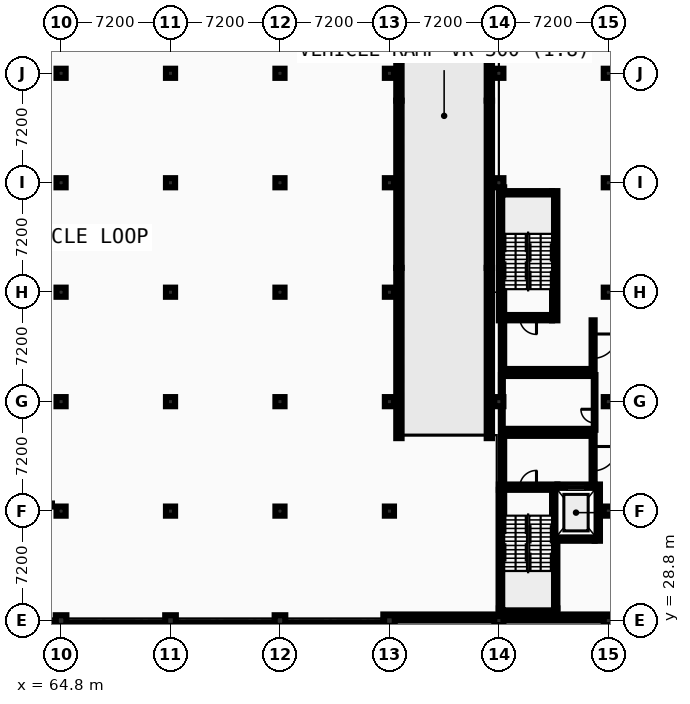
"""IFC4 building model, lengths in metres.
Left out: names, types, materials, properties, quantities, classifications, styles, units other than length and angle.
Written with IfcOpenShell. Run it as: python <this file> out.ifc"""

import sys

from ifc_helpers import new_model, si_unit, direction, frame, frame_2d, origin, origin_2d, place, context, subcontext, project, spatial, rectangle, extrude, element, fill, save


model = new_model("IFC4")
c1 = context("Model", 3, precision=1e-05, world=origin(), true_north=direction((0.0, 1.0)))
c2 = subcontext(c1, "Body", "Model", "MODEL_VIEW")
j1 = project(units=[si_unit("LENGTHUNIT", "METRE"), si_unit("PLANEANGLEUNIT", "RADIAN")], contexts=[c1])
p1 = place(None, origin())
s1 = spatial("IfcSite", under=j1, at=p1, CompositionType="ELEMENT")
p2 = place(p1, origin())
s2 = spatial("IfcBuilding", under=s1, at=p2, CompositionType="ELEMENT")
p3 = place(p2, frame((0.0, 0.0, -4.8)))
s3 = spatial("IfcBuildingStorey", under=s2, at=p3, CompositionType="ELEMENT", Elevation=-4.8)
p4 = place(p3, frame((64.8, 28.8, 0.0), z_axis=(0.0, 0.0, 1.0), x_axis=(1.0, 0.0, 0.0)))
e1 = element("IfcColumn", 1, at=p4, inside=s3, PredefinedType="COLUMN", context=c2, shape_type="SweptSolid", body=[
    extrude(rectangle(XDim=0.7, YDim=0.7, at=origin_2d()), origin(), (0.0, 0.0, 1.0), 4.8),
])
for number, where, z_axis, x_axis in (
    (2, (64.8, 36.0, 0.0), (0.0, 0.0, 1.0), (1.0, 0.0, 0.0)),
    (3, (64.8, 43.2, 0.0), (0.0, 0.0, 1.0), (1.0, 0.0, 0.0)),
    (4, (64.8, 50.4, 0.0), (0.0, 0.0, 1.0), (1.0, 0.0, 0.0)),
    (5, (64.8, 57.6, 0.0), (0.0, 0.0, 1.0), (1.0, 0.0, 0.0)),
    (6, (64.8, 64.8, 0.0), (0.0, 0.0, 1.0), (1.0, 0.0, 0.0)),
):
    element("IfcColumn", number, at=place(p3, frame(where, z_axis=z_axis, x_axis=x_axis)), inside=s3, PredefinedType="COLUMN", context=c2, shape_type="SweptSolid", body=[
        extrude(rectangle(XDim=0.6, YDim=0.6, at=origin_2d()), origin(), (0.0, 0.0, 1.0), 4.8),
    ])
p5 = place(p3, frame((72.0, 28.8, 0.0), z_axis=(0.0, 0.0, 1.0), x_axis=(1.0, 0.0, 0.0)))
e7 = element("IfcColumn", 7, at=p5, inside=s3, PredefinedType="COLUMN", context=c2, shape_type="SweptSolid", body=[
    extrude(rectangle(XDim=0.7, YDim=0.7, at=origin_2d()), origin(), (0.0, 0.0, 1.0), 4.8),
])
for number, where, z_axis, x_axis in (
    (8, (72.0, 36.0, 0.0), (0.0, 0.0, 1.0), (1.0, 0.0, 0.0)),
    (9, (72.0, 43.2, 0.0), (0.0, 0.0, 1.0), (1.0, 0.0, 0.0)),
    (10, (72.0, 50.4, 0.0), (0.0, 0.0, 1.0), (1.0, 0.0, 0.0)),
    (11, (72.0, 57.6, 0.0), (0.0, 0.0, 1.0), (1.0, 0.0, 0.0)),
    (12, (72.0, 64.8, 0.0), (0.0, 0.0, 1.0), (1.0, 0.0, 0.0)),
):
    element("IfcColumn", number, at=place(p3, frame(where, z_axis=z_axis, x_axis=x_axis)), inside=s3, PredefinedType="COLUMN", context=c2, shape_type="SweptSolid", body=[
        extrude(rectangle(XDim=0.6, YDim=0.6, at=origin_2d()), origin(), (0.0, 0.0, 1.0), 4.8),
    ])
p6 = place(p3, frame((79.2, 28.8, 0.0), z_axis=(0.0, 0.0, 1.0), x_axis=(1.0, 0.0, 0.0)))
e13 = element("IfcColumn", 13, at=p6, inside=s3, PredefinedType="COLUMN", context=c2, shape_type="SweptSolid", body=[
    extrude(rectangle(XDim=0.7, YDim=0.7, at=origin_2d()), origin(), (0.0, 0.0, 1.0), 4.8),
])
for number, where, z_axis, x_axis in (
    (14, (79.2, 36.0, 0.0), (0.0, 0.0, 1.0), (1.0, 0.0, 0.0)),
    (15, (79.2, 43.2, 0.0), (0.0, 0.0, 1.0), (1.0, 0.0, 0.0)),
    (16, (79.2, 50.4, 0.0), (0.0, 0.0, 1.0), (1.0, 0.0, 0.0)),
    (17, (79.2, 57.6, 0.0), (0.0, 0.0, 1.0), (1.0, 0.0, 0.0)),
    (18, (79.2, 64.8, 0.0), (0.0, 0.0, 1.0), (1.0, 0.0, 0.0)),
):
    element("IfcColumn", number, at=place(p3, frame(where, z_axis=z_axis, x_axis=x_axis)), inside=s3, PredefinedType="COLUMN", context=c2, shape_type="SweptSolid", body=[
        extrude(rectangle(XDim=0.6, YDim=0.6, at=origin_2d()), origin(), (0.0, 0.0, 1.0), 4.8),
    ])
p7 = place(p3, frame((86.4, 28.8, 0.0), z_axis=(0.0, 0.0, 1.0), x_axis=(1.0, 0.0, 0.0)))
e19 = element("IfcColumn", 19, at=p7, inside=s3, PredefinedType="COLUMN", context=c2, shape_type="SweptSolid", body=[
    extrude(rectangle(XDim=0.7, YDim=0.7, at=origin_2d()), origin(), (0.0, 0.0, 1.0), 4.8),
])
for number, where, z_axis, x_axis in (
    (20, (86.4, 36.0, 0.0), (0.0, 0.0, 1.0), (1.0, 0.0, 0.0)),
    (21, (86.4, 43.2, 0.0), (0.0, 0.0, 1.0), (1.0, 0.0, 0.0)),
    (22, (86.4, 50.4, 0.0), (0.0, 0.0, 1.0), (1.0, 0.0, 0.0)),
    (23, (86.4, 57.6, 0.0), (0.0, 0.0, 1.0), (1.0, 0.0, 0.0)),
    (24, (86.4, 64.8, 0.0), (0.0, 0.0, 1.0), (1.0, 0.0, 0.0)),
    (25, (93.6, 28.8, 0.0), (0.0, 0.0, 1.0), (1.0, 0.0, 0.0)),
    (26, (93.6, 43.2, 0.0), (0.0, 0.0, 1.0), (1.0, 0.0, 0.0)),
    (27, (93.6, 57.6, 0.0), (0.0, 0.0, 1.0), (1.0, 0.0, 0.0)),
    (28, (93.6, 64.8, 0.0), (0.0, 0.0, 1.0), (1.0, 0.0, 0.0)),
    (29, (100.8, 28.8, 0.0), (0.0, 0.0, 1.0), (1.0, 0.0, 0.0)),
    (30, (100.8, 36.0, 0.0), (0.0, 0.0, 1.0), (1.0, 0.0, 0.0)),
    (31, (100.8, 43.2, 0.0), (0.0, 0.0, 1.0), (1.0, 0.0, 0.0)),
    (32, (100.8, 50.4, 0.0), (0.0, 0.0, 1.0), (1.0, 0.0, 0.0)),
    (33, (100.8, 57.6, 0.0), (0.0, 0.0, 1.0), (1.0, 0.0, 0.0)),
    (34, (100.8, 64.8, 0.0), (0.0, 0.0, 1.0), (1.0, 0.0, 0.0)),
):
    element("IfcColumn", number, at=place(p3, frame(where, z_axis=z_axis, x_axis=x_axis)), inside=s3, PredefinedType="COLUMN", context=c2, shape_type="SweptSolid", body=[
        extrude(rectangle(XDim=0.6, YDim=0.6, at=origin_2d()), origin(), (0.0, 0.0, 1.0), 4.8),
    ])
p8 = place(p3, frame((86.2, 0.4, 0.0), z_axis=(0.0, 0.0, 1.0), x_axis=(0.0, 1.0, 0.0)))
e35 = element("IfcWall", 35, at=p8, inside=s3, PredefinedType="USERDEFINED", context=c2, shape_type="SweptSolid", body=[
    extrude(rectangle(XDim=28.4, YDim=0.4, at=frame_2d((14.2, 0.0))), origin(), (0.0, 0.0, 1.0), 4.545),
])
p9 = place(p3, frame((86.0, 29.0, 0.0), z_axis=(0.0, 0.0, 1.0), x_axis=(1.0, 0.0, 0.0)))
e36 = element("IfcWall", 36, at=p9, inside=s3, PredefinedType="USERDEFINED", context=c2, shape_type="SweptSolid", body=[
    extrude(rectangle(XDim=36.4, YDim=0.4, at=frame_2d((18.2, 0.0))), origin(), (0.0, 0.0, 1.0), 4.545),
])
p10 = place(p3, frame((87.025, 40.8, 0.0), z_axis=(0.0, 0.0, 1.0), x_axis=(0.0, 1.0, 0.0)))
e37 = element("IfcWall", 37, at=p10, inside=s3, PredefinedType="USERDEFINED", context=c2, shape_type="SweptSolid", body=[
    extrude(rectangle(XDim=11.2, YDim=0.35, at=frame_2d((5.6, 0.0))), origin(), (0.0, 0.0, 1.0), 4.58),
])
p11 = place(p3, frame((87.025, 52.0, 0.0), z_axis=(0.0, 0.0, 1.0), x_axis=(0.0, 1.0, 0.0)))
e38 = element("IfcWall", 38, at=p11, inside=s3, PredefinedType="USERDEFINED", context=c2, shape_type="SweptSolid", body=[
    extrude(rectangle(XDim=11.0, YDim=0.35, at=frame_2d((5.5, 0.0))), origin(), (0.0, 0.0, 1.0), 4.58),
])
p12 = place(p3, frame((87.025, 63.0, 0.0), z_axis=(0.0, 0.0, 1.0), x_axis=(0.0, 1.0, 0.0)))
e39 = element("IfcWall", 39, at=p12, inside=s3, PredefinedType="USERDEFINED", context=c2, shape_type="SweptSolid", body=[
    extrude(rectangle(XDim=15.8, YDim=0.35, at=frame_2d((7.9, 0.0))), origin(), (0.0, 0.0, 1.0), 4.58),
])
p13 = place(p3, frame((92.975, 40.8, 0.0), z_axis=(0.0, 0.0, 1.0), x_axis=(0.0, 1.0, 0.0)))
e40 = element("IfcWall", 40, at=p13, inside=s3, PredefinedType="USERDEFINED", context=c2, shape_type="SweptSolid", body=[
    extrude(rectangle(XDim=11.2, YDim=0.35, at=frame_2d((5.6, 0.0))), origin(), (0.0, 0.0, 1.0), 4.58),
])
p14 = place(p3, frame((92.975, 52.0, 0.0), z_axis=(0.0, 0.0, 1.0), x_axis=(0.0, 1.0, 0.0)))
e41 = element("IfcWall", 41, at=p14, inside=s3, PredefinedType="USERDEFINED", context=c2, shape_type="SweptSolid", body=[
    extrude(rectangle(XDim=11.0, YDim=0.35, at=frame_2d((5.5, 0.0))), origin(), (0.0, 0.0, 1.0), 4.58),
])
p15 = place(p3, frame((92.975, 63.0, 0.0), z_axis=(0.0, 0.0, 1.0), x_axis=(0.0, 1.0, 0.0)))
e42 = element("IfcWall", 42, at=p15, inside=s3, PredefinedType="USERDEFINED", context=c2, shape_type="SweptSolid", body=[
    extrude(rectangle(XDim=15.8, YDim=0.35, at=frame_2d((7.9, 0.0))), origin(), (0.0, 0.0, 1.0), 4.58),
])
p16 = place(p3, frame((93.6, 29.425, 0.0), z_axis=(0.0, 0.0, 1.0), x_axis=(1.0, 0.0, 0.0)))
e43 = element("IfcWall", 43, at=p16, inside=s3, PredefinedType="SHEAR", context=c2, shape_type="SweptSolid", body=[
    extrude(rectangle(XDim=3.85, YDim=0.35, at=frame_2d((1.925, 0.0))), origin(), (0.0, 0.0, 1.0), 4.545),
])
p17 = place(p3, frame((93.6, 37.575, 0.0), z_axis=(0.0, 0.0, 1.0), x_axis=(1.0, 0.0, 0.0)))
e44 = element("IfcWall", 44, at=p17, inside=s3, PredefinedType="SHEAR", context=c2, shape_type="SweptSolid", body=[
    extrude(rectangle(XDim=3.85, YDim=0.35, at=frame_2d((1.925, 0.0))), origin(), (0.0, 0.0, 1.0), 4.545),
])
p18 = place(p17, frame((1.375, 0.0, 0.0)))
e45 = element("IfcOpeningElement", 45, at=p18, cuts=e44, PredefinedType="OPENING", context=c2, shape_type="SweptSolid", body=[
    extrude(rectangle(XDim=1.1, YDim=2.15, at=frame_2d((0.55, 1.075))), frame((0.0, 0.185, 0.0), z_axis=(0.0, -1.0, 0.0), x_axis=(1.0, 0.0, 0.0)), (0.0, 0.0, 1.0), 0.37),
])
for number, where, z_axis, x_axis in (
    (46, (93.775, 29.6, 0.0), (0.0, 0.0, 1.0), (0.0, 1.0, 0.0)),
    (47, (97.275, 29.6, 0.0), (0.0, 0.0, 1.0), (0.0, 1.0, 0.0)),
):
    element("IfcWall", number, at=place(p3, frame(where, z_axis=z_axis, x_axis=x_axis)), inside=s3, PredefinedType="SHEAR", context=c2, shape_type="SweptSolid", body=[
        extrude(rectangle(XDim=7.8, YDim=0.35, at=frame_2d((3.9, 0.0))), origin(), (0.0, 0.0, 1.0), 4.545),
    ])
p19 = place(p3, frame((97.45, 34.225, 0.0), z_axis=(0.0, 0.0, 1.0), x_axis=(1.0, 0.0, 0.0)))
e48 = element("IfcWall", 48, at=p19, inside=s3, PredefinedType="SHEAR", context=c2, shape_type="SweptSolid", body=[
    extrude(rectangle(XDim=2.45, YDim=0.35, at=frame_2d((1.225, 0.0))), origin(), (0.0, 0.0, 1.0), 4.545),
])
p20 = place(p3, frame((97.45, 37.575, 0.0), z_axis=(0.0, 0.0, 1.0), x_axis=(1.0, 0.0, 0.0)))
e49 = element("IfcWall", 49, at=p20, inside=s3, PredefinedType="SHEAR", context=c2, shape_type="SweptSolid", body=[
    extrude(rectangle(XDim=2.45, YDim=0.35, at=frame_2d((1.225, 0.0))), origin(), (0.0, 0.0, 1.0), 4.545),
])
p21 = place(p20, frame((0.625, 0.0, 0.0)))
e50 = element("IfcOpeningElement", 50, at=p21, cuts=e49, PredefinedType="OPENING", context=c2, shape_type="SweptSolid", body=[
    extrude(rectangle(XDim=1.2, YDim=2.2, at=frame_2d((0.6, 1.1))), frame((0.0, 0.185, 0.0), z_axis=(0.0, -1.0, 0.0), x_axis=(1.0, 0.0, 0.0)), (0.0, 0.0, 1.0), 0.37),
])
p22 = place(p3, frame((100.075, 34.05, 0.0), z_axis=(0.0, 0.0, 1.0), x_axis=(0.0, 1.0, 0.0)))
e51 = element("IfcWall", 51, at=p22, inside=s3, PredefinedType="SHEAR", context=c2, shape_type="SweptSolid", body=[
    extrude(rectangle(XDim=3.7, YDim=0.35, at=frame_2d((1.85, 0.0))), origin(), (0.0, 0.0, 1.0), 4.545),
])
p23 = place(p3, frame((99.8, 37.75, 0.0), z_axis=(0.0, 0.0, 1.0), x_axis=(0.0, 1.0, 0.0)))
e52 = element("IfcWall", 52, at=p23, inside=s3, PredefinedType="PARTITIONING", context=c2, shape_type="SweptSolid", body=[
    extrude(rectangle(XDim=3.4, YDim=0.2, at=frame_2d((1.7, 0.0))), origin(), (0.0, 0.0, 1.0), 4.545),
])
p24 = place(p23, frame((0.9, 0.0, 0.0)))
e53 = element("IfcOpeningElement", 53, at=p24, cuts=e52, PredefinedType="OPENING", context=c2, shape_type="SweptSolid", body=[
    extrude(rectangle(XDim=1.6, YDim=2.2, at=frame_2d((0.8, 1.1))), frame((0.0, 0.11, 0.0), z_axis=(0.0, -1.0, 0.0), x_axis=(1.0, 0.0, 0.0)), (0.0, 0.0, 1.0), 0.22),
])
p25 = place(p3, frame((93.95, 41.05, 0.0), z_axis=(0.0, 0.0, 1.0), x_axis=(1.0, 0.0, 0.0)))
e54 = element("IfcWall", 54, at=p25, inside=s3, PredefinedType="PARTITIONING", context=c2, shape_type="SweptSolid", body=[
    extrude(rectangle(XDim=5.75, YDim=0.2, at=frame_2d((2.875, 0.0))), origin(), (0.0, 0.0, 1.0), 4.545),
])
p26 = place(p3, frame((93.85, 37.75, 0.0), z_axis=(0.0, 0.0, 1.0), x_axis=(0.0, 1.0, 0.0)))
e55 = element("IfcWall", 55, at=p26, inside=s3, PredefinedType="PARTITIONING", context=c2, shape_type="SweptSolid", body=[
    extrude(rectangle(XDim=3.4, YDim=0.2, at=frame_2d((1.7, 0.0))), origin(), (0.0, 0.0, 1.0), 4.545),
])
p27 = place(p3, frame((93.95, 48.725, 0.0), z_axis=(0.0, 0.0, 1.0), x_axis=(1.0, 0.0, 0.0)))
e56 = element("IfcWall", 56, at=p27, inside=s3, PredefinedType="SHEAR", context=c2, shape_type="SweptSolid", body=[
    extrude(rectangle(XDim=3.15, YDim=0.35, at=frame_2d((1.575, 0.0))), origin(), (0.0, 0.0, 1.0), 4.545),
])
p28 = place(p27, frame((1.025, 0.0, 0.0)))
e57 = element("IfcOpeningElement", 57, at=p28, cuts=e56, PredefinedType="OPENING", context=c2, shape_type="SweptSolid", body=[
    extrude(rectangle(XDim=1.1, YDim=2.15, at=frame_2d((0.55, 1.075))), frame((0.0, 0.185, 0.0), z_axis=(0.0, -1.0, 0.0), x_axis=(1.0, 0.0, 0.0)), (0.0, 0.0, 1.0), 0.37),
])
p29 = place(p3, frame((93.95, 56.875, 0.0), z_axis=(0.0, 0.0, 1.0), x_axis=(1.0, 0.0, 0.0)))
e58 = element("IfcWall", 58, at=p29, inside=s3, PredefinedType="SHEAR", context=c2, shape_type="SweptSolid", body=[
    extrude(rectangle(XDim=3.15, YDim=0.35, at=frame_2d((1.575, 0.0))), origin(), (0.0, 0.0, 1.0), 4.545),
])
p30 = place(p3, frame((93.775, 48.55, 0.0), z_axis=(0.0, 0.0, 1.0), x_axis=(0.0, 1.0, 0.0)))
e59 = element("IfcWall", 59, at=p30, inside=s3, PredefinedType="SHEAR", context=c2, shape_type="SweptSolid", body=[
    extrude(rectangle(XDim=8.75, YDim=0.35, at=frame_2d((4.375, 0.0))), origin(), (0.0, 0.0, 1.0), 4.545),
])
p31 = place(p3, frame((97.275, 48.55, 0.0), z_axis=(0.0, 0.0, 1.0), x_axis=(0.0, 1.0, 0.0)))
e60 = element("IfcWall", 60, at=p31, inside=s3, PredefinedType="SHEAR", context=c2, shape_type="SweptSolid", body=[
    extrude(rectangle(XDim=8.5, YDim=0.35, at=frame_2d((4.25, 0.0))), origin(), (0.0, 0.0, 1.0), 4.545),
])
p32 = place(p3, frame((99.8, 45.15, 0.0), z_axis=(0.0, 0.0, 1.0), x_axis=(0.0, 1.0, 0.0)))
e61 = element("IfcWall", 61, at=p32, inside=s3, PredefinedType="PARTITIONING", context=c2, shape_type="SweptSolid", body=[
    extrude(rectangle(XDim=3.4, YDim=0.2, at=frame_2d((1.7, 0.0))), origin(), (0.0, 0.0, 1.0), 4.545),
])
p33 = place(p32, frame((0.9, 0.0, 0.0)))
e62 = element("IfcOpeningElement", 62, at=p33, cuts=e61, PredefinedType="OPENING", context=c2, shape_type="SweptSolid", body=[
    extrude(rectangle(XDim=1.6, YDim=2.2, at=frame_2d((0.8, 1.1))), frame((0.0, 0.11, 0.0), z_axis=(0.0, -1.0, 0.0), x_axis=(1.0, 0.0, 0.0)), (0.0, 0.0, 1.0), 0.22),
])
p34 = place(p3, frame((93.95, 45.25, 0.0), z_axis=(0.0, 0.0, 1.0), x_axis=(1.0, 0.0, 0.0)))
e63 = element("IfcWall", 63, at=p34, inside=s3, PredefinedType="PARTITIONING", context=c2, shape_type="SweptSolid", body=[
    extrude(rectangle(XDim=5.75, YDim=0.2, at=frame_2d((2.875, 0.0))), origin(), (0.0, 0.0, 1.0), 4.545),
])
p35 = place(p3, frame((93.85, 45.15, 0.0), z_axis=(0.0, 0.0, 1.0), x_axis=(0.0, 1.0, 0.0)))
e64 = element("IfcWall", 64, at=p35, inside=s3, PredefinedType="PARTITIONING", context=c2, shape_type="SweptSolid", body=[
    extrude(rectangle(XDim=3.4, YDim=0.2, at=frame_2d((1.7, 0.0))), origin(), (0.0, 0.0, 1.0), 4.545),
])
p36 = place(p3, frame((58.7, 28.6, 0.0), z_axis=(0.0, 0.0, 1.0), x_axis=(1.0, 0.0, 0.0)))
e65 = element("IfcWall", 65, at=p36, inside=s3, PredefinedType="PARTITIONING", context=c2, shape_type="SweptSolid", body=[
    extrude(rectangle(XDim=5.72, YDim=0.125, at=frame_2d((2.86, 0.0))), origin(), (0.0, 0.0, 1.0), 4.095),
])
for number, where, z_axis, x_axis in (
    (66, (65.18, 28.6, 0.0), (0.0, 0.0, 1.0), (1.0, 0.0, 0.0)),
    (67, (72.38, 28.6, 0.0), (0.0, 0.0, 1.0), (1.0, 0.0, 0.0)),
):
    element("IfcWall", number, at=place(p3, frame(where, z_axis=z_axis, x_axis=x_axis)), inside=s3, PredefinedType="PARTITIONING", context=c2, shape_type="SweptSolid", body=[
        extrude(rectangle(XDim=6.44, YDim=0.125, at=frame_2d((3.22, 0.0))), origin(), (0.0, 0.0, 1.0), 4.095),
    ])
p37 = place(p3, frame((79.58, 28.6, 0.0), z_axis=(0.0, 0.0, 1.0), x_axis=(1.0, 0.0, 0.0)))
e68 = element("IfcWall", 68, at=p37, inside=s3, PredefinedType="PARTITIONING", context=c2, shape_type="SweptSolid", body=[
    extrude(rectangle(XDim=6.4, YDim=0.125, at=frame_2d((3.2, 0.0))), origin(), (0.0, 0.0, 1.0), 4.095),
])
for number, where, z_axis, x_axis in (
    (69, (93.97, 41.35, 0.0), (0.0, 0.0, 1.0), (1.0, 0.0, 0.0)),
    (70, (93.97, 44.95, 0.0), (0.0, 0.0, 1.0), (1.0, 0.0, 0.0)),
):
    element("IfcWall", number, at=place(p3, frame(where, z_axis=z_axis, x_axis=x_axis)), inside=s3, PredefinedType="PARTITIONING", context=c2, shape_type="SweptSolid", body=[
        extrude(rectangle(XDim=5.71, YDim=0.125, at=frame_2d((2.855, 0.0))), origin(), (0.0, 0.0, 1.0), 4.545),
    ])
p38 = place(p3, frame((93.8, 41.35, 0.0), z_axis=(0.0, 0.0, 1.0), x_axis=(0.0, 1.0, 0.0)))
e71 = element("IfcWall", 71, at=p38, inside=s3, PredefinedType="PARTITIONING", context=c2, shape_type="SweptSolid", body=[
    extrude(rectangle(XDim=1.47, YDim=0.11, at=frame_2d((0.735, 0.0))), origin(), (0.0, 0.0, 1.0), 4.545),
])
p39 = place(p3, frame((93.8, 43.58, 0.0), z_axis=(0.0, 0.0, 1.0), x_axis=(0.0, 1.0, 0.0)))
e72 = element("IfcWall", 72, at=p39, inside=s3, PredefinedType="PARTITIONING", context=c2, shape_type="SweptSolid", body=[
    extrude(rectangle(XDim=1.37, YDim=0.125, at=frame_2d((0.685, 0.0))), origin(), (0.0, 0.0, 1.0), 4.545),
])
p40 = place(p3, frame((99.9, 41.35, 0.0), z_axis=(0.0, 0.0, 1.0), x_axis=(0.0, 1.0, 0.0)))
e73 = element("IfcWall", 73, at=p40, inside=s3, PredefinedType="PARTITIONING", context=c2, shape_type="SweptSolid", body=[
    extrude(rectangle(XDim=3.6, YDim=0.11, at=frame_2d((1.8, 0.0))), origin(), (0.0, 0.0, 1.0), 4.545),
])
p41 = place(p40, frame((0.45, 0.0, 0.0)))
e74 = element("IfcOpeningElement", 74, at=p41, cuts=e73, PredefinedType="OPENING", context=c2, shape_type="SweptSolid", body=[
    extrude(rectangle(XDim=0.9, YDim=2.1, at=frame_2d((0.45, 1.05))), frame((0.0, 0.065, 0.0), z_axis=(0.0, -1.0, 0.0), x_axis=(1.0, 0.0, 0.0)), (0.0, 0.0, 1.0), 0.13),
])
p42 = place(p18, frame((1.1, 0.0, 0.0), z_axis=(0.0, 0.0, 1.0), x_axis=(-1.0, 0.0, 0.0)))
e75 = element("IfcDoor", 75, at=p42, inside=s3, OperationType="SINGLE_SWING_RIGHT", PredefinedType="DOOR", context=c2, shape_type="SweptSolid", body=[
    extrude(rectangle(XDim=1.1, YDim=2.15, at=frame_2d((0.55, 1.075))), frame((0.0, 0.025, 0.0), z_axis=(0.0, -1.0, 0.0), x_axis=(1.0, 0.0, 0.0)), (0.0, 0.0, 1.0), 0.05),
])
fill(e45, e75)
p43 = place(p21, origin())
e76 = element("IfcDoor", 76, at=p43, inside=s3, OperationType="SLIDING_TO_RIGHT", PredefinedType="DOOR", context=c2, shape_type="SweptSolid", body=[
    extrude(rectangle(XDim=1.2, YDim=2.2, at=frame_2d((0.6, 1.1))), frame((0.0, 0.025, 0.0), z_axis=(0.0, -1.0, 0.0), x_axis=(1.0, 0.0, 0.0)), (0.0, 0.0, 1.0), 0.05),
])
fill(e50, e76)
p44 = place(p24, origin())
e77 = element("IfcDoor", 77, at=p44, inside=s3, OperationType="DOUBLE_DOOR_SINGLE_SWING", PredefinedType="DOOR", context=c2, shape_type="SweptSolid", body=[
    extrude(rectangle(XDim=1.6, YDim=2.2, at=frame_2d((0.8, 1.1))), frame((0.0, 0.025, 0.0), z_axis=(0.0, -1.0, 0.0), x_axis=(1.0, 0.0, 0.0)), (0.0, 0.0, 1.0), 0.05),
])
fill(e53, e77)
p45 = place(p28, origin())
e78 = element("IfcDoor", 78, at=p45, inside=s3, OperationType="SINGLE_SWING_RIGHT", PredefinedType="DOOR", context=c2, shape_type="SweptSolid", body=[
    extrude(rectangle(XDim=1.1, YDim=2.15, at=frame_2d((0.55, 1.075))), frame((0.0, 0.025, 0.0), z_axis=(0.0, -1.0, 0.0), x_axis=(1.0, 0.0, 0.0)), (0.0, 0.0, 1.0), 0.05),
])
fill(e57, e78)
p46 = place(p33, origin())
e79 = element("IfcDoor", 79, at=p46, inside=s3, OperationType="DOUBLE_DOOR_SINGLE_SWING", PredefinedType="DOOR", context=c2, shape_type="SweptSolid", body=[
    extrude(rectangle(XDim=1.6, YDim=2.2, at=frame_2d((0.8, 1.1))), frame((0.0, 0.025, 0.0), z_axis=(0.0, -1.0, 0.0), x_axis=(1.0, 0.0, 0.0)), (0.0, 0.0, 1.0), 0.05),
])
fill(e62, e79)
p47 = place(p41, frame((0.9, 0.0, 0.0), z_axis=(0.0, 0.0, 1.0), x_axis=(-1.0, 0.0, 0.0)))
e80 = element("IfcDoor", 80, at=p47, inside=s3, OperationType="SINGLE_SWING_RIGHT", PredefinedType="DOOR", context=c2, shape_type="SweptSolid", body=[
    extrude(rectangle(XDim=0.9, YDim=2.1, at=frame_2d((0.45, 1.05))), frame((0.0, 0.025, 0.0), z_axis=(0.0, -1.0, 0.0), x_axis=(1.0, 0.0, 0.0)), (0.0, 0.0, 1.0), 0.05),
])
fill(e74, e80)
save(model, sys.argv[1])
